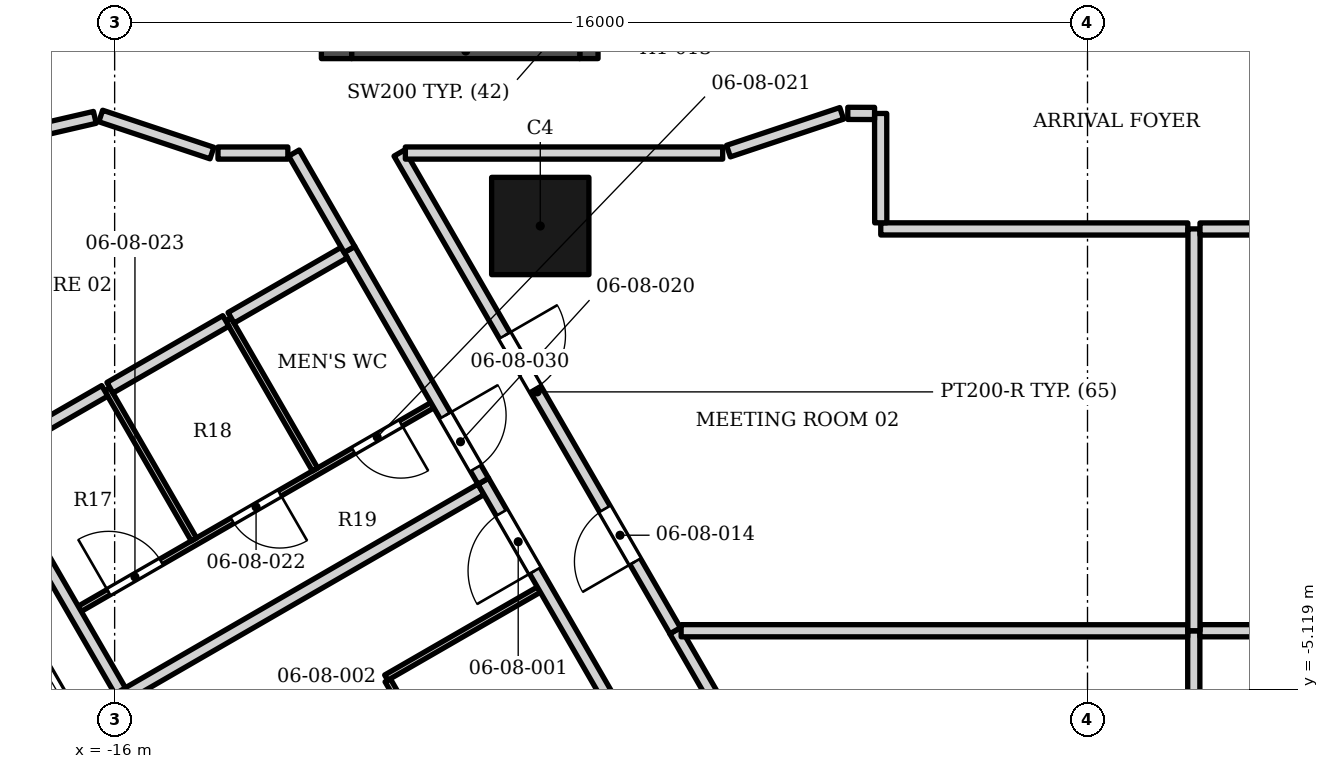
"""IFC4 building model, lengths in metres.
Left out: names, types, materials, properties, quantities, classifications, styles, units other than length and angle.
Written with IfcOpenShell. Run it as: python <this file> out.ifc"""

import sys

from ifc_helpers import new_model, si_unit, direction, frame, frame_2d, origin, origin_2d, place, context, subcontext, project, spatial, rectangle, extrude, element, fill, save


model = new_model("IFC4")
c1 = context("Model", 3, precision=1e-05, world=origin(), true_north=direction((0.0, 1.0)))
c2 = subcontext(c1, "Body", "Model", "MODEL_VIEW")
j1 = project(units=[si_unit("LENGTHUNIT", "METRE"), si_unit("PLANEANGLEUNIT", "RADIAN")], contexts=[c1])
p1 = place(None, origin())
s1 = spatial("IfcSite", under=j1, at=p1, CompositionType="ELEMENT")
p2 = place(p1, origin())
s2 = spatial("IfcBuilding", under=s1, at=p2, CompositionType="ELEMENT")
p3 = place(p2, frame((0.0, 0.0, 46.0)))
s3 = spatial("IfcBuildingStorey", under=s2, at=p3, CompositionType="ELEMENT", Elevation=46.0)
p4 = place(p3, frame((-12.35, 5.253, 0.0), z_axis=(0.0, 0.0, 1.0), x_axis=(0.0, 1.0, 0.0)))
e1 = element("IfcWall", 1, at=p4, inside=s3, PredefinedType="SHEAR", context=c2, shape_type="SweptSolid", body=[
    extrude(rectangle(XDim=13.3, YDim=0.5, at=frame_2d((6.65, 0.0))), origin(), (0.0, 0.0, 1.0), 3.4),
])
p5 = place(p3, frame((-8.2, 5.253, 0.0), z_axis=(0.0, 0.0, 1.0), x_axis=(0.0, 1.0, 0.0)))
e2 = element("IfcWall", 2, at=p5, inside=s3, PredefinedType="SHEAR", context=c2, shape_type="SweptSolid", body=[
    extrude(rectangle(XDim=13.3, YDim=0.3, at=frame_2d((6.65, 0.0))), origin(), (0.0, 0.0, 1.0), 3.4),
])
p6 = place(p5, frame((7.1, 0.0, 0.0)))
e3 = element("IfcOpeningElement", 3, at=p6, cuts=e2, PredefinedType="OPENING", context=c2, shape_type="SweptSolid", body=[
    extrude(rectangle(XDim=1.4, YDim=2.1, at=frame_2d((0.7, 1.05))), frame((0.0, 0.16, 0.0), z_axis=(0.0, -1.0, 0.0), x_axis=(1.0, 0.0, 0.0)), (0.0, 0.0, 1.0), 0.32),
])
p7 = place(p5, frame((5.05, 0.0, 0.0)))
e4 = element("IfcOpeningElement", 4, at=p7, cuts=e2, PredefinedType="OPENING", context=c2, shape_type="SweptSolid", body=[
    extrude(rectangle(XDim=1.4, YDim=2.1, at=frame_2d((0.7, 1.05))), frame((0.0, 0.16, 0.0), z_axis=(0.0, -1.0, 0.0), x_axis=(1.0, 0.0, 0.0)), (0.0, 0.0, 1.0), 0.32),
])
p8 = place(p3, frame((-12.1, 5.378, 0.0), z_axis=(0.0, 0.0, 1.0), x_axis=(1.0, 0.0, 0.0)))
e5 = element("IfcWall", 5, at=p8, inside=s3, PredefinedType="SHEAR", context=c2, shape_type="SweptSolid", body=[
    extrude(rectangle(XDim=3.75, YDim=0.25, at=frame_2d((1.875, 0.0))), origin(), (0.0, 0.0, 1.0), 3.4),
])
p9 = place(p3, frame((-9.0, 2.5, 0.0), z_axis=(0.0, 0.0, 1.0), x_axis=(1.0, 0.0, 0.0)))
e6 = element("IfcColumn", 6, at=p9, inside=s3, PredefinedType="COLUMN", context=c2, shape_type="SweptSolid", body=[
    extrude(rectangle(XDim=1.6, YDim=1.6, at=origin_2d()), origin(), (0.0, 0.0, 1.0), 3.4),
])
p10 = place(p3, frame((-18.816, -1.915, 0.0), z_axis=(0.0, 0.0, 1.0), x_axis=(0.500002543286, -0.866023935413, 0.0)))
e7 = element("IfcWall", 7, at=p10, inside=s3, PredefinedType="ELEMENTEDWALL", context=c2, shape_type="SweptSolid", body=[
    extrude(rectangle(XDim=4.2, YDim=0.2, at=frame_2d((2.1, 0.0))), origin(), (0.0, 0.0, 1.0), 2.628),
])
p11 = place(p10, frame((0.3, 0.0, 0.6)))
e8 = element("IfcOpeningElement", 8, at=p11, cuts=e7, PredefinedType="OPENING", context=c2, shape_type="SweptSolid", body=[
    extrude(rectangle(XDim=2.1, YDim=1.8, at=frame_2d((1.05, 0.9))), frame((0.0, 0.11, 0.0), z_axis=(0.0, -1.0, 0.0), x_axis=(1.0, 0.0, 0.0)), (0.0, 0.0, 1.0), 0.22),
])
p12 = place(p10, frame((2.7, 0.0, 0.0)))
e9 = element("IfcOpeningElement", 9, at=p12, cuts=e7, PredefinedType="OPENING", context=c2, shape_type="SweptSolid", body=[
    extrude(rectangle(XDim=1.2, YDim=2.4, at=frame_2d((0.6, 1.2))), frame((0.0, 0.11, 0.0), z_axis=(0.0, -1.0, 0.0), x_axis=(1.0, 0.0, 0.0)), (0.0, 0.0, 1.0), 0.22),
])
p13 = place(p3, frame((1.75, -12.87, 0.0), z_axis=(0.0, 0.0, 1.0), x_axis=(0.499999309361, 0.866025802525, 0.0)))
e10 = element("IfcWall", 10, at=p13, inside=s3, PredefinedType="PARTITIONING", context=c2, shape_type="SweptSolid", body=[
    extrude(rectangle(XDim=19.134, YDim=0.2, at=frame_2d((9.567, 0.0))), origin(), (0.0, 0.0, 1.0), 2.302),
])
p14 = place(p13, frame((14.098, 0.0, 0.0)))
e11 = element("IfcOpeningElement", 11, at=p14, cuts=e10, PredefinedType="OPENING", context=c2, shape_type="SweptSolid", body=[
    extrude(rectangle(XDim=1.0, YDim=2.1, at=frame_2d((0.5, 1.05))), frame((0.0, 0.11, 0.0), z_axis=(0.0, -1.0, 0.0), x_axis=(1.0, 0.0, 0.0)), (0.0, 0.0, 1.0), 0.22),
])
p15 = place(p13, frame((4.53, 0.0, 0.0)))
e12 = element("IfcOpeningElement", 12, at=p15, cuts=e10, PredefinedType="OPENING", context=c2, shape_type="SweptSolid", body=[
    extrude(rectangle(XDim=1.0, YDim=2.1, at=frame_2d((0.5, 1.05))), frame((0.0, 0.11, 0.0), z_axis=(0.0, -1.0, 0.0), x_axis=(1.0, 0.0, 0.0)), (0.0, 0.0, 1.0), 0.22),
])
p16 = place(p3, frame((1.748, -12.674, 0.0), z_axis=(0.0, 0.0, 1.0), x_axis=(0.0, 1.0, 0.0)))
e13 = element("IfcWall", 13, at=p16, inside=s3, PredefinedType="PARTITIONING", context=c2, shape_type="SweptSolid", body=[
    extrude(rectangle(XDim=8.516, YDim=0.2, at=frame_2d((4.258, 0.0))), origin(), (0.0, 0.0, 1.0), 2.302),
])
p17 = place(p3, frame((-11.509, -4.97, 0.0), z_axis=(0.0, 0.0, 1.0), x_axis=(0.500018594424, -0.866014668023, 0.0)))
e14 = element("IfcWall", 14, at=p17, inside=s3, PredefinedType="PARTITIONING", context=c2, shape_type="SweptSolid", body=[
    extrude(rectangle(XDim=2.45, YDim=0.1, at=frame_2d((1.225, 0.0))), origin(), (0.0, 0.0, 1.0), 3.23),
])
p18 = place(p17, frame((0.8, 0.0, 0.0)))
e15 = element("IfcOpeningElement", 15, at=p18, cuts=e14, PredefinedType="OPENING", context=c2, shape_type="SweptSolid", body=[
    extrude(rectangle(XDim=0.9, YDim=2.1, at=frame_2d((0.45, 1.05))), frame((0.0, 0.06, 0.0), z_axis=(0.0, -1.0, 0.0), x_axis=(1.0, 0.0, 0.0)), (0.0, 0.0, 1.0), 0.12),
])
p19 = place(p3, frame((-6.783, -4.156, 0.0), z_axis=(0.0, 0.0, 1.0), x_axis=(0.500162761554, -0.865931412962, 0.0)))
e16 = element("IfcWall", 16, at=p19, inside=s3, PredefinedType="PARTITIONING", context=c2, shape_type="SweptSolid", body=[
    extrude(rectangle(XDim=13.566, YDim=0.2, at=frame_2d((6.783, 0.0))), origin(), (0.0, 0.0, 1.0), 2.302),
])
p20 = place(p19, frame((4.642, 0.0, 0.0)))
e17 = element("IfcOpeningElement", 17, at=p20, cuts=e16, PredefinedType="OPENING", context=c2, shape_type="SweptSolid", body=[
    extrude(rectangle(XDim=0.9, YDim=2.1, at=frame_2d((0.45, 1.05))), frame((0.0, 0.11, 0.0), z_axis=(0.0, -1.0, 0.0), x_axis=(1.0, 0.0, 0.0)), (0.0, 0.0, 1.0), 0.22),
])
p21 = place(p3, frame((-6.683, -4.156, 0.0), z_axis=(0.0, 0.0, 1.0), x_axis=(0.99999997896, -0.000205134212, 0.0)))
e18 = element("IfcWall", 18, at=p21, inside=s3, PredefinedType="PARTITIONING", context=c2, shape_type="SweptSolid", body=[
    extrude(rectangle(XDim=8.331, YDim=0.2, at=frame_2d((4.166, 0.0))), origin(), (0.0, 0.0, 1.0), 3.23),
])
p22 = place(p3, frame((1.85, -4.156, 0.0), z_axis=(0.0, 0.0, 1.0), x_axis=(0.999999937456, -0.000353678232, 0.0)))
e19 = element("IfcWall", 19, at=p22, inside=s3, PredefinedType="PARTITIONING", context=c2, shape_type="SweptSolid", body=[
    extrude(rectangle(XDim=4.832, YDim=0.2, at=frame_2d((2.416, 0.0))), origin(), (0.0, 0.0, 1.0), 3.23),
])
p23 = place(p3, frame((-16.574, -3.795, 0.0), z_axis=(0.0, 0.0, 1.0), x_axis=(0.866015588977, 0.500016999361, 0.0)))
e20 = element("IfcWall", 20, at=p23, inside=s3, PredefinedType="PARTITIONING", context=c2, shape_type="SweptSolid", body=[
    extrude(rectangle(XDim=6.697, YDim=0.1, at=frame_2d((3.348, 0.0))), origin(), (0.0, 0.0, 1.0), 2.384),
])
p24 = place(p23, frame((5.198, 0.0, 0.0)))
e21 = element("IfcOpeningElement", 21, at=p24, cuts=e20, PredefinedType="OPENING", context=c2, shape_type="SweptSolid", body=[
    extrude(rectangle(XDim=0.9, YDim=2.1, at=frame_2d((0.45, 1.05))), frame((0.0, 0.06, 0.0), z_axis=(0.0, -1.0, 0.0), x_axis=(1.0, 0.0, 0.0)), (0.0, 0.0, 1.0), 0.12),
])
p25 = place(p23, frame((2.898, 0.0, 0.0)))
e22 = element("IfcOpeningElement", 22, at=p25, cuts=e20, PredefinedType="OPENING", context=c2, shape_type="SweptSolid", body=[
    extrude(rectangle(XDim=0.9, YDim=2.1, at=frame_2d((0.45, 1.05))), frame((0.0, 0.06, 0.0), z_axis=(0.0, -1.0, 0.0), x_axis=(1.0, 0.0, 0.0)), (0.0, 0.0, 1.0), 0.12),
])
p26 = place(p23, frame((0.548, 0.0, 0.0)))
e23 = element("IfcOpeningElement", 23, at=p26, cuts=e20, PredefinedType="OPENING", context=c2, shape_type="SweptSolid", body=[
    extrude(rectangle(XDim=1.0, YDim=2.1, at=frame_2d((0.5, 1.05))), frame((0.0, 0.06, 0.0), z_axis=(0.0, -1.0, 0.0), x_axis=(1.0, 0.0, 0.0)), (0.0, 0.0, 1.0), 0.12),
])
p27 = place(p3, frame((-11.534, -4.927, 0.0), z_axis=(0.0, 0.0, 1.0), x_axis=(0.866293497561, 0.499535360193, 0.0)))
e24 = element("IfcWall", 24, at=p27, inside=s3, PredefinedType="PARTITIONING", context=c2, shape_type="SweptSolid", body=[
    extrude(rectangle(XDim=2.9, YDim=0.1, at=frame_2d((1.45, 0.0))), origin(), (0.0, 0.0, 1.0), 2.552),
])
p28 = place(p3, frame((-16.122, -0.185, 0.0), z_axis=(0.0, 0.0, 1.0), x_axis=(0.500026428979, -0.866010144469, 0.0)))
e25 = element("IfcWall", 25, at=p28, inside=s3, PredefinedType="PARTITIONING", context=c2, shape_type="SweptSolid", body=[
    extrude(rectangle(XDim=2.85, YDim=0.1, at=frame_2d((1.425, 0.0))), origin(), (0.0, 0.0, 1.0), 3.23),
])
p29 = place(p3, frame((-16.251, -5.457, 0.0), z_axis=(0.0, 0.0, 1.0), x_axis=(0.865900080757, 0.500217003055, 0.0)))
e26 = element("IfcWall", 26, at=p29, inside=s3, PredefinedType="PARTITIONING", context=c2, shape_type="SweptSolid", body=[
    extrude(rectangle(XDim=7.25, YDim=0.2, at=frame_2d((3.625, 0.0))), origin(), (0.0, 0.0, 1.0), 2.384),
])
p30 = place(p3, frame((-9.937, -1.698, 0.0), z_axis=(0.0, 0.0, 1.0), x_axis=(0.500001173101, -0.866024726493, 0.0)))
e27 = element("IfcWall", 27, at=p30, inside=s3, PredefinedType="PARTITIONING", context=c2, shape_type="SweptSolid", body=[
    extrude(rectangle(XDim=13.598, YDim=0.2, at=frame_2d((6.799, 0.0))), origin(), (0.0, 0.0, 1.0), 2.302),
])
p31 = place(p30, frame((0.598, 0.0, 0.0)))
e28 = element("IfcOpeningElement", 28, at=p31, cuts=e27, PredefinedType="OPENING", context=c2, shape_type="SweptSolid", body=[
    extrude(rectangle(XDim=1.1, YDim=2.1, at=frame_2d((0.55, 1.05))), frame((0.0, 0.11, 0.0), z_axis=(0.0, -1.0, 0.0), x_axis=(1.0, 0.0, 0.0)), (0.0, 0.0, 1.0), 0.22),
])
p32 = place(p30, frame((7.398, 0.0, 0.0)))
e29 = element("IfcOpeningElement", 29, at=p32, cuts=e27, PredefinedType="OPENING", context=c2, shape_type="SweptSolid", body=[
    extrude(rectangle(XDim=1.0, YDim=2.1, at=frame_2d((0.5, 1.05))), frame((0.0, 0.11, 0.0), z_axis=(0.0, -1.0, 0.0), x_axis=(1.0, 0.0, 0.0)), (0.0, 0.0, 1.0), 0.22),
])
p33 = place(p30, frame((9.798, 0.0, 0.0)))
e30 = element("IfcOpeningElement", 30, at=p33, cuts=e27, PredefinedType="OPENING", context=c2, shape_type="SweptSolid", body=[
    extrude(rectangle(XDim=1.0, YDim=2.1, at=frame_2d((0.5, 1.05))), frame((0.0, 0.11, 0.0), z_axis=(0.0, -1.0, 0.0), x_axis=(1.0, 0.0, 0.0)), (0.0, 0.0, 1.0), 0.22),
])
p34 = place(p3, frame((-12.137, 2.113, 0.0), z_axis=(0.0, 0.0, 1.0), x_axis=(0.500025132165, -0.866010893236, 0.0)))
e31 = element("IfcWall", 31, at=p34, inside=s3, PredefinedType="PARTITIONING", context=c2, shape_type="SweptSolid", body=[
    extrude(rectangle(XDim=4.399, YDim=0.2, at=frame_2d((2.199, 0.0))), origin(), (0.0, 0.0, 1.0), 3.23),
])
p35 = place(p34, frame((3.15, 0.0, 0.0)))
e32 = element("IfcOpeningElement", 32, at=p35, cuts=e31, PredefinedType="OPENING", context=c2, shape_type="SweptSolid", body=[
    extrude(rectangle(XDim=1.0, YDim=2.1, at=frame_2d((0.5, 1.05))), frame((0.0, 0.11, 0.0), z_axis=(0.0, -1.0, 0.0), x_axis=(1.0, 0.0, 0.0)), (0.0, 0.0, 1.0), 0.22),
])
p36 = place(p3, frame((-14.13, 0.965, 0.0), z_axis=(0.0, 0.0, 1.0), x_axis=(0.499962189394, -0.866047232647, 0.0)))
e33 = element("IfcWall", 33, at=p36, inside=s3, PredefinedType="PARTITIONING", context=c2, shape_type="SweptSolid", body=[
    extrude(rectangle(XDim=2.85, YDim=0.1, at=frame_2d((1.425, 0.0))), origin(), (0.0, 0.0, 1.0), 2.384),
])
p37 = place(p3, frame((-18.112, -1.334, 0.0), z_axis=(0.0, 0.0, 1.0), x_axis=(0.500522433527, -0.865723566467, 0.0)))
e34 = element("IfcWall", 34, at=p37, inside=s3, PredefinedType="PARTITIONING", context=c2, shape_type="SweptSolid", body=[
    extrude(rectangle(XDim=4.402, YDim=0.2, at=frame_2d((2.201, 0.0))), origin(), (0.0, 0.0, 1.0), 2.628),
])
p38 = place(p3, frame((1.438, -16.419, 0.0), z_axis=(0.0, 0.0, 1.0), x_axis=(0.499996012009, 0.86602770624, 0.0)))
e35 = element("IfcWall", 35, at=p38, inside=s3, PredefinedType="PARTITIONING", context=c2, shape_type="SweptSolid", body=[
    extrude(rectangle(XDim=18.0, YDim=0.2, at=frame_2d((9.0, 0.0))), origin(), (0.0, 0.0, 1.0), 2.302),
])
p39 = place(p38, frame((4.0, 0.0, 0.0)))
e36 = element("IfcOpeningElement", 36, at=p39, cuts=e35, PredefinedType="OPENING", context=c2, shape_type="SweptSolid", body=[
    extrude(rectangle(XDim=1.0, YDim=2.1, at=frame_2d((0.5, 1.05))), frame((0.0, 0.11, 0.0), z_axis=(0.0, -1.0, 0.0), x_axis=(1.0, 0.0, 0.0)), (0.0, 0.0, 1.0), 0.22),
])
p40 = place(p38, frame((9.8, 0.0, 0.0)))
e37 = element("IfcOpeningElement", 37, at=p40, cuts=e35, PredefinedType="OPENING", context=c2, shape_type="SweptSolid", body=[
    extrude(rectangle(XDim=1.1, YDim=2.1, at=frame_2d((0.55, 1.05))), frame((0.0, 0.11, 0.0), z_axis=(0.0, -1.0, 0.0), x_axis=(1.0, 0.0, 0.0)), (0.0, 0.0, 1.0), 0.22),
])
p41 = place(p3, frame((-18.025, -1.284, 0.0), z_axis=(0.0, 0.0, 1.0), x_axis=(0.866399153158, 0.499352087617, 0.0)))
e38 = element("IfcWall", 38, at=p41, inside=s3, PredefinedType="PARTITIONING", context=c2, shape_type="SweptSolid", body=[
    extrude(rectangle(XDim=2.15, YDim=0.2, at=frame_2d((1.075, 0.0))), origin(), (0.0, 0.0, 1.0), 2.628),
])
p42 = place(p3, frame((-16.077, -0.159, 0.0), z_axis=(0.0, 0.0, 1.0), x_axis=(0.866399851823, 0.499350875398, 0.0)))
e39 = element("IfcWall", 39, at=p42, inside=s3, PredefinedType="PARTITIONING", context=c2, shape_type="SweptSolid", body=[
    extrude(rectangle(XDim=2.2, YDim=0.2, at=frame_2d((1.1, 0.0))), origin(), (0.0, 0.0, 1.0), 3.23),
])
p43 = place(p3, frame((-14.085, 0.99, 0.0), z_axis=(0.0, 0.0, 1.0), x_axis=(0.866397457795, 0.499355029139, 0.0)))
e40 = element("IfcWall", 40, at=p43, inside=s3, PredefinedType="PARTITIONING", context=c2, shape_type="SweptSolid", body=[
    extrude(rectangle(XDim=2.148, YDim=0.2, at=frame_2d((1.074, 0.0))), origin(), (0.0, 0.0, 1.0), 2.384),
])
p44 = place(p3, frame((-3.4, 2.452, 0.0), z_axis=(0.0, 0.0, 1.0), x_axis=(0.99999994274, -0.000338409456, 0.0)))
e41 = element("IfcWall", 41, at=p44, inside=s3, PredefinedType="PARTITIONING", context=c2, shape_type="SweptSolid", body=[
    extrude(rectangle(XDim=5.05, YDim=0.2, at=frame_2d((2.525, 0.0))), origin(), (0.0, 0.0, 1.0), 3.23),
])
p45 = place(p3, frame((1.75, -4.156, 0.0), z_axis=(0.0, 0.0, 1.0), x_axis=(0.000258617496, 0.999999966558, 0.0)))
e42 = element("IfcWall", 42, at=p45, inside=s3, PredefinedType="PARTITIONING", context=c2, shape_type="SweptSolid", body=[
    extrude(rectangle(XDim=6.608, YDim=0.2, at=frame_2d((3.304, 0.0))), origin(), (0.0, 0.0, 1.0), 3.23),
])
p46 = place(p3, frame((1.85, 2.451, 0.0), z_axis=(0.0, 0.0, 1.0), x_axis=(0.999999305627, 0.00117845036, 0.0)))
e43 = element("IfcWall", 43, at=p46, inside=s3, PredefinedType="PARTITIONING", context=c2, shape_type="SweptSolid", body=[
    extrude(rectangle(XDim=1.45, YDim=0.2, at=frame_2d((0.725, 0.0))), origin(), (0.0, 0.0, 1.0), 3.23),
])
p47 = place(p3, frame((-3.402, 4.351, 0.0), z_axis=(0.0, 0.0, 1.0), x_axis=(0.001086217961, -0.999999410065, 0.0)))
e44 = element("IfcWall", 44, at=p47, inside=s3, PredefinedType="PARTITIONING", context=c2, shape_type="SweptSolid", body=[
    extrude(rectangle(XDim=1.798, YDim=0.2, at=frame_2d((0.899, 0.0))), origin(), (0.0, 0.0, 1.0), 3.23),
])
p48 = place(p3, frame((-14.3, 3.699, 0.0), z_axis=(0.0, 0.0, 1.0), x_axis=(1.0, 0.0, 0.0)))
e45 = element("IfcWall", 45, at=p48, inside=s3, PredefinedType="PARTITIONING", context=c2, shape_type="SweptSolid", body=[
    extrude(rectangle(XDim=1.149, YDim=0.2, at=frame_2d((0.574, 0.0))), origin(), (0.0, 0.0, 1.0), 2.384),
])
p49 = place(p3, frame((-13.052, 3.699, 0.0), z_axis=(0.0, 0.0, 1.0), x_axis=(0.499341081767, -0.866405496324, 0.0)))
e46 = element("IfcWall", 46, at=p49, inside=s3, PredefinedType="PARTITIONING", context=c2, shape_type="SweptSolid", body=[
    extrude(rectangle(XDim=1.829, YDim=0.2, at=frame_2d((0.915, 0.0))), origin(), (0.0, 0.0, 1.0), 3.23),
])
p50 = place(p3, frame((-11.319, 3.7, 0.0), z_axis=(0.0, 0.0, 1.0), x_axis=(0.500165052219, -0.865930089868, 0.0)))
e47 = element("IfcWall", 47, at=p50, inside=s3, PredefinedType="PARTITIONING", context=c2, shape_type="SweptSolid", body=[
    extrude(rectangle(XDim=9.072, YDim=0.2, at=frame_2d((4.536, 0.0))), origin(), (0.0, 0.0, 1.0), 2.552),
])
p51 = place(p50, frame((6.758, 0.0, 0.0)))
e48 = element("IfcOpeningElement", 48, at=p51, cuts=e47, PredefinedType="OPENING", context=c2, shape_type="SweptSolid", body=[
    extrude(rectangle(XDim=1.0, YDim=2.1, at=frame_2d((0.5, 1.05))), frame((0.0, 0.11, 0.0), z_axis=(0.0, -1.0, 0.0), x_axis=(1.0, 0.0, 0.0)), (0.0, 0.0, 1.0), 0.22),
])
p52 = place(p50, frame((3.466, 0.0, 0.0)))
e49 = element("IfcOpeningElement", 49, at=p52, cuts=e47, PredefinedType="OPENING", context=c2, shape_type="SweptSolid", body=[
    extrude(rectangle(XDim=1.0, YDim=2.1, at=frame_2d((0.5, 1.05))), frame((0.0, 0.11, 0.0), z_axis=(0.0, -1.0, 0.0), x_axis=(1.0, 0.0, 0.0)), (0.0, 0.0, 1.0), 0.22),
])
p53 = place(p3, frame((-11.219, 3.7, 0.0), z_axis=(0.0, 0.0, 1.0), x_axis=(1.0, 0.0, 0.0)))
e50 = element("IfcWall", 50, at=p53, inside=s3, PredefinedType="PARTITIONING", context=c2, shape_type="SweptSolid", body=[
    extrude(rectangle(XDim=5.219, YDim=0.2, at=frame_2d((2.609, 0.0))), origin(), (0.0, 0.0, 1.0), 2.832),
])
p54 = place(p3, frame((-17.903, 3.922, 0.0), z_axis=(0.0, 0.0, 1.0), x_axis=(0.974302124523, 0.225245133464, 0.0)))
e51 = element("IfcWall", 51, at=p54, inside=s3, PredefinedType="PARTITIONING", context=c2, shape_type="SweptSolid", body=[
    extrude(rectangle(XDim=1.618, YDim=0.2, at=frame_2d((0.809, 0.0))), origin(), (0.0, 0.0, 1.0), 2.628),
])
p55 = place(p3, frame((-16.229, 4.309, 0.0), z_axis=(0.0, 0.0, 1.0), x_axis=(0.948657960303, -0.316303769112, 0.0)))
e52 = element("IfcWall", 52, at=p55, inside=s3, PredefinedType="PARTITIONING", context=c2, shape_type="SweptSolid", body=[
    extrude(rectangle(XDim=1.927, YDim=0.2, at=frame_2d((0.964, 0.0))), origin(), (0.0, 0.0, 1.0), 3.23),
])
p56 = place(p3, frame((-5.905, 3.731, 0.0), z_axis=(0.0, 0.0, 1.0), x_axis=(0.948695731075, 0.316190464499, 0.0)))
e53 = element("IfcWall", 53, at=p56, inside=s3, PredefinedType="PARTITIONING", context=c2, shape_type="SweptSolid", body=[
    extrude(rectangle(XDim=1.964, YDim=0.2, at=frame_2d((0.982, 0.0))), origin(), (0.0, 0.0, 1.0), 2.384),
])
p57 = place(p3, frame((-3.942, 4.352, 0.0), z_axis=(0.0, 0.0, 1.0), x_axis=(0.999996159087, -0.00277160798, 0.0)))
e54 = element("IfcWall", 54, at=p57, inside=s3, PredefinedType="PARTITIONING", context=c2, shape_type="SweptSolid", body=[
    extrude(rectangle(XDim=0.44, YDim=0.2, at=frame_2d((0.22, 0.0))), origin(), (0.0, 0.0, 1.0), 3.23),
])
p58 = place(p12, origin())
e55 = element("IfcDoor", 55, at=p58, inside=s3, OperationType="SINGLE_SWING_LEFT", PredefinedType="DOOR", context=c2, shape_type="SweptSolid", body=[
    extrude(rectangle(XDim=1.2, YDim=2.4, at=frame_2d((0.6, 1.2))), frame((0.0, 0.025, 0.0), z_axis=(0.0, -1.0, 0.0), x_axis=(1.0, 0.0, 0.0)), (0.0, 0.0, 1.0), 0.05),
])
fill(e9, e55)
p59 = place(p31, origin())
e56 = element("IfcDoor", 56, at=p59, inside=s3, OperationType="SINGLE_SWING_RIGHT", PredefinedType="DOOR", context=c2, shape_type="SweptSolid", body=[
    extrude(rectangle(XDim=1.1, YDim=2.1, at=frame_2d((0.55, 1.05))), frame((0.0, 0.025, 0.0), z_axis=(0.0, -1.0, 0.0), x_axis=(1.0, 0.0, 0.0)), (0.0, 0.0, 1.0), 0.05),
])
fill(e28, e56)
p60 = place(p51, origin())
e57 = element("IfcDoor", 57, at=p60, inside=s3, OperationType="SINGLE_SWING_RIGHT", PredefinedType="DOOR", context=c2, shape_type="SweptSolid", body=[
    extrude(rectangle(XDim=1.0, YDim=2.1, at=frame_2d((0.5, 1.05))), frame((0.0, 0.025, 0.0), z_axis=(0.0, -1.0, 0.0), x_axis=(1.0, 0.0, 0.0)), (0.0, 0.0, 1.0), 0.05),
])
fill(e48, e57)
p61 = place(p35, origin())
e58 = element("IfcDoor", 58, at=p61, inside=s3, OperationType="SINGLE_SWING_LEFT", PredefinedType="DOOR", context=c2, shape_type="SweptSolid", body=[
    extrude(rectangle(XDim=1.0, YDim=2.1, at=frame_2d((0.5, 1.05))), frame((0.0, 0.025, 0.0), z_axis=(0.0, -1.0, 0.0), x_axis=(1.0, 0.0, 0.0)), (0.0, 0.0, 1.0), 0.05),
])
fill(e32, e58)
p62 = place(p24, origin())
e59 = element("IfcDoor", 59, at=p62, inside=s3, OperationType="SINGLE_SWING_RIGHT", PredefinedType="DOOR", context=c2, shape_type="SweptSolid", body=[
    extrude(rectangle(XDim=0.9, YDim=2.1, at=frame_2d((0.45, 1.05))), frame((0.0, 0.025, 0.0), z_axis=(0.0, -1.0, 0.0), x_axis=(1.0, 0.0, 0.0)), (0.0, 0.0, 1.0), 0.05),
])
fill(e21, e59)
p63 = place(p25, origin())
e60 = element("IfcDoor", 60, at=p63, inside=s3, OperationType="SINGLE_SWING_RIGHT", PredefinedType="DOOR", context=c2, shape_type="SweptSolid", body=[
    extrude(rectangle(XDim=0.9, YDim=2.1, at=frame_2d((0.45, 1.05))), frame((0.0, 0.025, 0.0), z_axis=(0.0, -1.0, 0.0), x_axis=(1.0, 0.0, 0.0)), (0.0, 0.0, 1.0), 0.05),
])
fill(e22, e60)
p64 = place(p26, origin())
e61 = element("IfcDoor", 61, at=p64, inside=s3, OperationType="SINGLE_SWING_LEFT", PredefinedType="DOOR", context=c2, shape_type="SweptSolid", body=[
    extrude(rectangle(XDim=1.0, YDim=2.1, at=frame_2d((0.5, 1.05))), frame((0.0, 0.025, 0.0), z_axis=(0.0, -1.0, 0.0), x_axis=(1.0, 0.0, 0.0)), (0.0, 0.0, 1.0), 0.05),
])
fill(e23, e61)
p65 = place(p52, origin())
e62 = element("IfcDoor", 62, at=p65, inside=s3, OperationType="SINGLE_SWING_LEFT", PredefinedType="DOOR", context=c2, shape_type="SweptSolid", body=[
    extrude(rectangle(XDim=1.0, YDim=2.1, at=frame_2d((0.5, 1.05))), frame((0.0, 0.025, 0.0), z_axis=(0.0, -1.0, 0.0), x_axis=(1.0, 0.0, 0.0)), (0.0, 0.0, 1.0), 0.05),
])
fill(e49, e62)
save(model, sys.argv[1])
